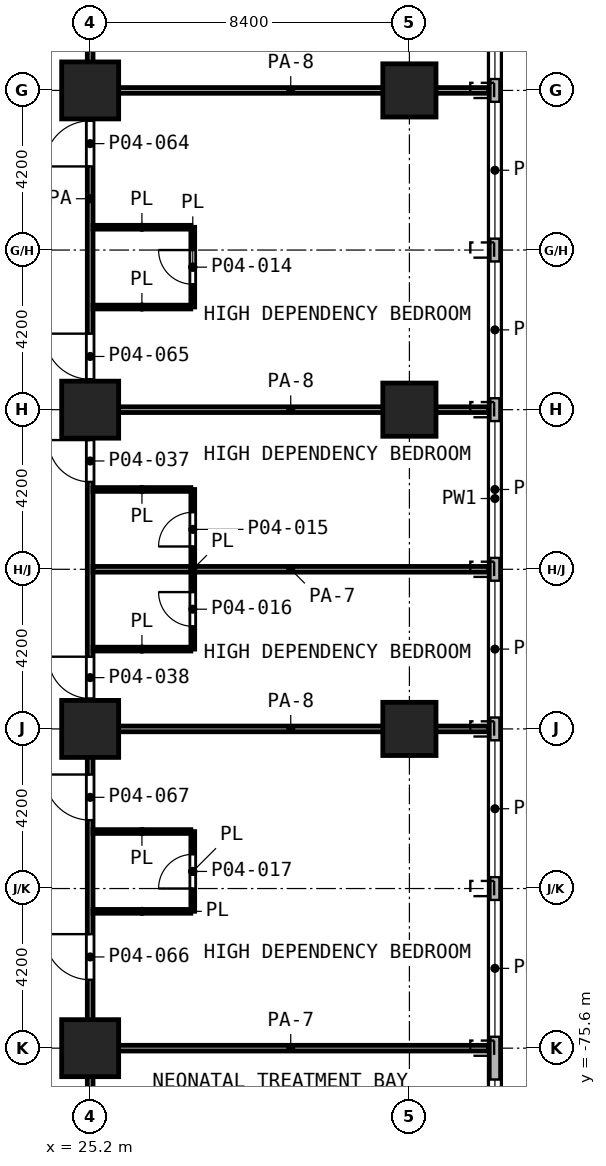
"""IFC4 building model, lengths in metres.
Left out: names, types, materials, properties, quantities, classifications, styles, units other than length and angle.
Written with IfcOpenShell. Run it as: python <this file> out.ifc"""

import sys

from ifc_helpers import new_model, si_unit, direction, frame, frame_2d, origin, origin_2d, place, context, subcontext, project, spatial, rectangle, extrude, element, fill, save


model = new_model("IFC4")
c1 = context("Model", 3, precision=1e-05, world=origin(), true_north=direction((0.0, 1.0)))
c2 = subcontext(c1, "Body", "Model", "MODEL_VIEW")
j1 = project(units=[si_unit("LENGTHUNIT", "METRE"), si_unit("PLANEANGLEUNIT", "RADIAN")], contexts=[c1])
p1 = place(None, origin())
s1 = spatial("IfcSite", under=j1, at=p1, CompositionType="ELEMENT")
p2 = place(p1, origin())
s2 = spatial("IfcBuilding", under=s1, at=p2, CompositionType="ELEMENT")
p3 = place(p2, frame((0.0, 0.0, 18.2)))
s3 = spatial("IfcBuildingStorey", under=s2, at=p3, CompositionType="ELEMENT", Elevation=18.2)
p4 = place(p3, frame((25.2, -50.4, 0.0), z_axis=(0.0, 0.0, 1.0), x_axis=(1.0, 0.0, 0.0)))
e1 = element("IfcColumn", 1, at=p4, inside=s3, PredefinedType="COLUMN", context=c2, shape_type="SweptSolid", body=[
    extrude(rectangle(XDim=1.5, YDim=1.5, at=origin_2d()), origin(), (0.0, 0.0, 1.0), 5.6),
])
p5 = place(p3, frame((33.6, -50.4, 0.0), z_axis=(0.0, 0.0, 1.0), x_axis=(1.0, 0.0, 0.0)))
e2 = element("IfcColumn", 2, at=p5, inside=s3, PredefinedType="COLUMN", context=c2, shape_type="SweptSolid", body=[
    extrude(rectangle(XDim=1.4, YDim=1.4, at=origin_2d()), origin(), (0.0, 0.0, 1.0), 5.6),
])
p6 = place(p3, frame((25.2, -58.8, 0.0), z_axis=(0.0, 0.0, 1.0), x_axis=(1.0, 0.0, 0.0)))
e3 = element("IfcColumn", 3, at=p6, inside=s3, PredefinedType="COLUMN", context=c2, shape_type="SweptSolid", body=[
    extrude(rectangle(XDim=1.5, YDim=1.5, at=origin_2d()), origin(), (0.0, 0.0, 1.0), 5.6),
])
p7 = place(p3, frame((33.6, -58.8, 0.0), z_axis=(0.0, 0.0, 1.0), x_axis=(1.0, 0.0, 0.0)))
e4 = element("IfcColumn", 4, at=p7, inside=s3, PredefinedType="COLUMN", context=c2, shape_type="SweptSolid", body=[
    extrude(rectangle(XDim=1.4, YDim=1.4, at=origin_2d()), origin(), (0.0, 0.0, 1.0), 5.6),
])
p8 = place(p3, frame((25.2, -67.2, 0.0), z_axis=(0.0, 0.0, 1.0), x_axis=(1.0, 0.0, 0.0)))
e5 = element("IfcColumn", 5, at=p8, inside=s3, PredefinedType="COLUMN", context=c2, shape_type="SweptSolid", body=[
    extrude(rectangle(XDim=1.5, YDim=1.5, at=origin_2d()), origin(), (0.0, 0.0, 1.0), 5.6),
])
p9 = place(p3, frame((33.6, -67.2, 0.0), z_axis=(0.0, 0.0, 1.0), x_axis=(1.0, 0.0, 0.0)))
e6 = element("IfcColumn", 6, at=p9, inside=s3, PredefinedType="COLUMN", context=c2, shape_type="SweptSolid", body=[
    extrude(rectangle(XDim=1.4, YDim=1.4, at=origin_2d()), origin(), (0.0, 0.0, 1.0), 5.6),
])
p10 = place(p3, frame((25.2, -75.6, 0.0), z_axis=(0.0, 0.0, 1.0), x_axis=(1.0, 0.0, 0.0)))
e7 = element("IfcColumn", 7, at=p10, inside=s3, PredefinedType="COLUMN", context=c2, shape_type="SweptSolid", body=[
    extrude(rectangle(XDim=1.5, YDim=1.5, at=origin_2d()), origin(), (0.0, 0.0, 1.0), 5.6),
])
p11 = place(p3, frame((35.85, -80.338, 0.0), z_axis=(0.0, 0.0, 1.0), x_axis=(0.0, 1.0, 0.0)))
e8 = element("IfcWall", 8, at=p11, inside=s3, PredefinedType="SOLIDWALL", context=c2, shape_type="SweptSolid", body=[
    extrude(rectangle(XDim=38.4, YDim=0.3, at=frame_2d((19.2, 0.0))), origin(), (0.0, 0.0, 1.0), 5.05),
])
p12 = place(p11, frame((1.513, 0.0, 0.9)))
e9 = element("IfcOpeningElement", 9, at=p12, cuts=e8, PredefinedType="OPENING", context=c2, shape_type="SweptSolid", body=[
    extrude(rectangle(XDim=2.4, YDim=3.0, at=frame_2d((1.2, 1.5))), frame((0.0, 0.16, 0.0), z_axis=(0.0, -1.0, 0.0), x_axis=(1.0, 0.0, 0.0)), (0.0, 0.0, 1.0), 0.32),
])
p13 = place(p11, frame((5.038, 0.0, 0.9)))
e10 = element("IfcOpeningElement", 10, at=p13, cuts=e8, PredefinedType="OPENING", context=c2, shape_type="SweptSolid", body=[
    extrude(rectangle(XDim=3.6, YDim=3.0, at=frame_2d((1.8, 1.5))), frame((0.0, 0.16, 0.0), z_axis=(0.0, -1.0, 0.0), x_axis=(1.0, 0.0, 0.0)), (0.0, 0.0, 1.0), 0.32),
])
p14 = place(p11, frame((9.238, 0.0, 0.9)))
e11 = element("IfcOpeningElement", 11, at=p14, cuts=e8, PredefinedType="OPENING", context=c2, shape_type="SweptSolid", body=[
    extrude(rectangle(XDim=3.6, YDim=3.0, at=frame_2d((1.8, 1.5))), frame((0.0, 0.16, 0.0), z_axis=(0.0, -1.0, 0.0), x_axis=(1.0, 0.0, 0.0)), (0.0, 0.0, 1.0), 0.32),
])
p15 = place(p11, frame((13.438, 0.0, 0.9)))
e12 = element("IfcOpeningElement", 12, at=p15, cuts=e8, PredefinedType="OPENING", context=c2, shape_type="SweptSolid", body=[
    extrude(rectangle(XDim=3.6, YDim=3.0, at=frame_2d((1.8, 1.5))), frame((0.0, 0.16, 0.0), z_axis=(0.0, -1.0, 0.0), x_axis=(1.0, 0.0, 0.0)), (0.0, 0.0, 1.0), 0.32),
])
p16 = place(p11, frame((17.638, 0.0, 0.9)))
e13 = element("IfcOpeningElement", 13, at=p16, cuts=e8, PredefinedType="OPENING", context=c2, shape_type="SweptSolid", body=[
    extrude(rectangle(XDim=3.6, YDim=3.0, at=frame_2d((1.8, 1.5))), frame((0.0, 0.16, 0.0), z_axis=(0.0, -1.0, 0.0), x_axis=(1.0, 0.0, 0.0)), (0.0, 0.0, 1.0), 0.32),
])
p17 = place(p11, frame((21.838, 0.0, 0.9)))
e14 = element("IfcOpeningElement", 14, at=p17, cuts=e8, PredefinedType="OPENING", context=c2, shape_type="SweptSolid", body=[
    extrude(rectangle(XDim=3.6, YDim=3.0, at=frame_2d((1.8, 1.5))), frame((0.0, 0.16, 0.0), z_axis=(0.0, -1.0, 0.0), x_axis=(1.0, 0.0, 0.0)), (0.0, 0.0, 1.0), 0.32),
])
p18 = place(p11, frame((26.038, 0.0, 0.9)))
e15 = element("IfcOpeningElement", 15, at=p18, cuts=e8, PredefinedType="OPENING", context=c2, shape_type="SweptSolid", body=[
    extrude(rectangle(XDim=3.6, YDim=3.0, at=frame_2d((1.8, 1.5))), frame((0.0, 0.16, 0.0), z_axis=(0.0, -1.0, 0.0), x_axis=(1.0, 0.0, 0.0)), (0.0, 0.0, 1.0), 0.32),
])
p19 = place(p11, frame((30.238, 0.0, 0.9)))
e16 = element("IfcOpeningElement", 16, at=p19, cuts=e8, PredefinedType="OPENING", context=c2, shape_type="SweptSolid", body=[
    extrude(rectangle(XDim=3.6, YDim=3.0, at=frame_2d((1.8, 1.5))), frame((0.0, 0.16, 0.0), z_axis=(0.0, -1.0, 0.0), x_axis=(1.0, 0.0, 0.0)), (0.0, 0.0, 1.0), 0.32),
])
p20 = place(p11, frame((34.438, 0.0, 0.9)))
e17 = element("IfcOpeningElement", 17, at=p20, cuts=e8, PredefinedType="OPENING", context=c2, shape_type="SweptSolid", body=[
    extrude(rectangle(XDim=3.6, YDim=3.0, at=frame_2d((1.8, 1.5))), frame((0.0, 0.16, 0.0), z_axis=(0.0, -1.0, 0.0), x_axis=(1.0, 0.0, 0.0)), (0.0, 0.0, 1.0), 0.32),
])
p21 = place(p3, frame((25.275, -72.0, 0.0), z_axis=(0.0, 0.0, 1.0), x_axis=(1.0, 0.0, 0.0)))
e18 = element("IfcWall", 18, at=p21, inside=s3, PredefinedType="PARTITIONING", context=c2, shape_type="SweptSolid", body=[
    extrude(rectangle(XDim=2.573, YDim=0.1, at=frame_2d((1.287, 0.0))), origin(), (0.0, 0.0, 1.0), 5.05),
])
p22 = place(p3, frame((25.275, -69.9, 0.0), z_axis=(0.0, 0.0, 1.0), x_axis=(1.0, 0.0, 0.0)))
e19 = element("IfcWall", 19, at=p22, inside=s3, PredefinedType="PARTITIONING", context=c2, shape_type="SweptSolid", body=[
    extrude(rectangle(XDim=2.574, YDim=0.1, at=frame_2d((1.287, 0.0))), origin(), (0.0, 0.0, 1.0), 5.05),
])
for number, where, z_axis, x_axis in (
    (20, (25.275, -65.1, 0.0), (0.0, 0.0, 1.0), (1.0, 0.0, 0.0)),
    (21, (25.275, -60.9, 0.0), (0.0, 0.0, 1.0), (1.0, 0.0, 0.0)),
):
    element("IfcWall", number, at=place(p3, frame(where, z_axis=z_axis, x_axis=x_axis)), inside=s3, PredefinedType="PARTITIONING", context=c2, shape_type="SweptSolid", body=[
        extrude(rectangle(XDim=2.575, YDim=0.1, at=frame_2d((1.288, 0.0))), origin(), (0.0, 0.0, 1.0), 5.05),
    ])
p23 = place(p3, frame((25.275, -56.1, 0.0), z_axis=(0.0, 0.0, 1.0), x_axis=(1.0, 0.0, 0.0)))
e22 = element("IfcWall", 22, at=p23, inside=s3, PredefinedType="PARTITIONING", context=c2, shape_type="SweptSolid", body=[
    extrude(rectangle(XDim=2.573, YDim=0.1, at=frame_2d((1.287, 0.0))), origin(), (0.0, 0.0, 1.0), 5.05),
])
p24 = place(p3, frame((25.275, -54.0, 0.0), z_axis=(0.0, 0.0, 1.0), x_axis=(1.0, 0.0, 0.0)))
e23 = element("IfcWall", 23, at=p24, inside=s3, PredefinedType="PARTITIONING", context=c2, shape_type="SweptSolid", body=[
    extrude(rectangle(XDim=2.574, YDim=0.1, at=frame_2d((1.287, 0.0))), origin(), (0.0, 0.0, 1.0), 5.05),
])
p25 = place(p3, frame((27.9, -71.998, 0.0), z_axis=(0.0, 0.0, 1.0), x_axis=(0.0, 1.0, 0.0)))
e24 = element("IfcWall", 24, at=p25, inside=s3, PredefinedType="PARTITIONING", context=c2, shape_type="SweptSolid", body=[
    extrude(rectangle(XDim=2.096, YDim=0.1, at=frame_2d((1.048, 0.0))), origin(), (0.0, 0.0, 1.0), 5.05),
])
p26 = place(p25, frame((0.598, 0.0, 0.0)))
e25 = element("IfcOpeningElement", 25, at=p26, cuts=e24, PredefinedType="OPENING", context=c2, shape_type="SweptSolid", body=[
    extrude(rectangle(XDim=0.9, YDim=2.1, at=frame_2d((0.45, 1.05))), frame((0.0, 0.06, 0.0), z_axis=(0.0, -1.0, 0.0), x_axis=(1.0, 0.0, 0.0)), (0.0, 0.0, 1.0), 0.12),
])
p27 = place(p3, frame((27.9, -65.1, 0.0), z_axis=(0.0, 0.0, 1.0), x_axis=(0.0, 1.0, 0.0)))
e26 = element("IfcWall", 26, at=p27, inside=s3, PredefinedType="PARTITIONING", context=c2, shape_type="SweptSolid", body=[
    extrude(rectangle(XDim=4.2, YDim=0.1, at=frame_2d((2.1, 0.0))), origin(), (0.0, 0.0, 1.0), 5.05),
])
p28 = place(p27, frame((2.7, 0.0, 0.0)))
e27 = element("IfcOpeningElement", 27, at=p28, cuts=e26, PredefinedType="OPENING", context=c2, shape_type="SweptSolid", body=[
    extrude(rectangle(XDim=0.9, YDim=2.1, at=frame_2d((0.45, 1.05))), frame((0.0, 0.06, 0.0), z_axis=(0.0, -1.0, 0.0), x_axis=(1.0, 0.0, 0.0)), (0.0, 0.0, 1.0), 0.12),
])
p29 = place(p27, frame((0.6, 0.0, 0.0)))
e28 = element("IfcOpeningElement", 28, at=p29, cuts=e26, PredefinedType="OPENING", context=c2, shape_type="SweptSolid", body=[
    extrude(rectangle(XDim=0.9, YDim=2.1, at=frame_2d((0.45, 1.05))), frame((0.0, 0.06, 0.0), z_axis=(0.0, -1.0, 0.0), x_axis=(1.0, 0.0, 0.0)), (0.0, 0.0, 1.0), 0.12),
])
p30 = place(p3, frame((27.9, -56.098, 0.0), z_axis=(0.0, 0.0, 1.0), x_axis=(0.0, 1.0, 0.0)))
e29 = element("IfcWall", 29, at=p30, inside=s3, PredefinedType="PARTITIONING", context=c2, shape_type="SweptSolid", body=[
    extrude(rectangle(XDim=2.096, YDim=0.1, at=frame_2d((1.048, 0.0))), origin(), (0.0, 0.0, 1.0), 5.05),
])
p31 = place(p30, frame((0.598, 0.0, 0.0)))
e30 = element("IfcOpeningElement", 30, at=p31, cuts=e29, PredefinedType="OPENING", context=c2, shape_type="SweptSolid", body=[
    extrude(rectangle(XDim=0.9, YDim=2.1, at=frame_2d((0.45, 1.05))), frame((0.0, 0.06, 0.0), z_axis=(0.0, -1.0, 0.0), x_axis=(1.0, 0.0, 0.0)), (0.0, 0.0, 1.0), 0.12),
])
p32 = place(p3, frame((25.275, -75.6, 0.0), z_axis=(0.0, 0.0, 1.0), x_axis=(1.0, 0.0, 0.0)))
e31 = element("IfcWall", 31, at=p32, inside=s3, PredefinedType="PARTITIONING", context=c2, shape_type="SweptSolid", body=[
    extrude(rectangle(XDim=10.405, YDim=0.15, at=frame_2d((5.203, 0.0))), origin(), (0.0, 0.0, 1.0), 3.65),
])
p33 = place(p3, frame((25.275, -67.2, 0.0), z_axis=(0.0, 0.0, 1.0), x_axis=(1.0, 0.0, 0.0)))
e32 = element("IfcWall", 32, at=p33, inside=s3, PredefinedType="PARTITIONING", context=c2, shape_type="SweptSolid", body=[
    extrude(rectangle(XDim=10.405, YDim=0.15, at=frame_2d((5.203, 0.0))), origin(), (0.0, 0.0, 1.0), 4.15),
])
p34 = place(p3, frame((25.275, -63.0, 0.0), z_axis=(0.0, 0.0, 1.0), x_axis=(1.0, 0.0, 0.0)))
e33 = element("IfcWall", 33, at=p34, inside=s3, PredefinedType="PARTITIONING", context=c2, shape_type="SweptSolid", body=[
    extrude(rectangle(XDim=10.405, YDim=0.15, at=frame_2d((5.203, 0.0))), origin(), (0.0, 0.0, 1.0), 3.65),
])
for number, where, z_axis, x_axis in (
    (34, (25.275, -58.8, 0.0), (0.0, 0.0, 1.0), (1.0, 0.0, 0.0)),
    (35, (25.275, -50.4, 0.0), (0.0, 0.0, 1.0), (1.0, 0.0, 0.0)),
):
    element("IfcWall", number, at=place(p3, frame(where, z_axis=z_axis, x_axis=x_axis)), inside=s3, PredefinedType="PARTITIONING", context=c2, shape_type="SweptSolid", body=[
        extrude(rectangle(XDim=10.405, YDim=0.15, at=frame_2d((5.203, 0.0))), origin(), (0.0, 0.0, 1.0), 4.15),
    ])
p35 = place(p3, frame((25.2, -81.3, 0.0), z_axis=(0.0, 0.0, 1.0), x_axis=(0.0, 1.0, 0.0)))
e36 = element("IfcWall", 36, at=p35, inside=s3, PredefinedType="PARTITIONING", context=c2, shape_type="SweptSolid", body=[
    extrude(rectangle(XDim=56.1, YDim=0.15, at=frame_2d((28.05, 0.0))), origin(), (0.0, 0.0, 1.0), 5.05),
])
p36 = place(p35, frame((48.5, 0.0, 0.0)))
e37 = element("IfcOpeningElement", 37, at=p36, cuts=e36, PredefinedType="OPENING", context=c2, shape_type="SweptSolid", body=[
    extrude(rectangle(XDim=1.2, YDim=2.1, at=frame_2d((0.6, 1.05))), frame((0.0, 0.085, 0.0), z_axis=(0.0, -1.0, 0.0), x_axis=(1.0, 0.0, 0.0)), (0.0, 0.0, 1.0), 0.17),
])
p37 = place(p35, frame((40.1, 0.0, 0.0)))
e38 = element("IfcOpeningElement", 38, at=p37, cuts=e36, PredefinedType="OPENING", context=c2, shape_type="SweptSolid", body=[
    extrude(rectangle(XDim=1.2, YDim=2.1, at=frame_2d((0.6, 1.05))), frame((0.0, 0.085, 0.0), z_axis=(0.0, -1.0, 0.0), x_axis=(1.0, 0.0, 0.0)), (0.0, 0.0, 1.0), 0.17),
])
p38 = place(p35, frame((37.3, 0.0, 0.0)))
e39 = element("IfcOpeningElement", 39, at=p38, cuts=e36, PredefinedType="OPENING", context=c2, shape_type="SweptSolid", body=[
    extrude(rectangle(XDim=1.2, YDim=2.1, at=frame_2d((0.6, 1.05))), frame((0.0, 0.085, 0.0), z_axis=(0.0, -1.0, 0.0), x_axis=(1.0, 0.0, 0.0)), (0.0, 0.0, 1.0), 0.17),
])
p39 = place(p35, frame((28.9, 0.0, 0.0)))
e40 = element("IfcOpeningElement", 40, at=p39, cuts=e36, PredefinedType="OPENING", context=c2, shape_type="SweptSolid", body=[
    extrude(rectangle(XDim=1.2, YDim=2.1, at=frame_2d((0.6, 1.05))), frame((0.0, 0.085, 0.0), z_axis=(0.0, -1.0, 0.0), x_axis=(1.0, 0.0, 0.0)), (0.0, 0.0, 1.0), 0.17),
])
p40 = place(p35, frame((23.3, 0.0, 0.0)))
e41 = element("IfcOpeningElement", 41, at=p40, cuts=e36, PredefinedType="OPENING", context=c2, shape_type="SweptSolid", body=[
    extrude(rectangle(XDim=1.2, YDim=2.1, at=frame_2d((0.6, 1.05))), frame((0.0, 0.085, 0.0), z_axis=(0.0, -1.0, 0.0), x_axis=(1.0, 0.0, 0.0)), (0.0, 0.0, 1.0), 0.17),
])
p41 = place(p35, frame((20.6, 0.0, 0.0)))
e42 = element("IfcOpeningElement", 42, at=p41, cuts=e36, PredefinedType="OPENING", context=c2, shape_type="SweptSolid", body=[
    extrude(rectangle(XDim=1.1, YDim=2.1, at=frame_2d((0.55, 1.05))), frame((0.0, 0.085, 0.0), z_axis=(0.0, -1.0, 0.0), x_axis=(1.0, 0.0, 0.0)), (0.0, 0.0, 1.0), 0.17),
])
p42 = place(p35, frame((14.9, 0.0, 0.0)))
e43 = element("IfcOpeningElement", 43, at=p42, cuts=e36, PredefinedType="OPENING", context=c2, shape_type="SweptSolid", body=[
    extrude(rectangle(XDim=1.1, YDim=2.1, at=frame_2d((0.55, 1.05))), frame((0.0, 0.085, 0.0), z_axis=(0.0, -1.0, 0.0), x_axis=(1.0, 0.0, 0.0)), (0.0, 0.0, 1.0), 0.17),
])
p43 = place(p35, frame((7.5, 0.0, 0.0)))
e44 = element("IfcOpeningElement", 44, at=p43, cuts=e36, PredefinedType="OPENING", context=c2, shape_type="SweptSolid", body=[
    extrude(rectangle(XDim=1.2, YDim=2.1, at=frame_2d((0.6, 1.05))), frame((0.0, 0.085, 0.0), z_axis=(0.0, -1.0, 0.0), x_axis=(1.0, 0.0, 0.0)), (0.0, 0.0, 1.0), 0.17),
])
p44 = place(p35, frame((11.7, 0.0, 0.0)))
e45 = element("IfcOpeningElement", 45, at=p44, cuts=e36, PredefinedType="OPENING", context=c2, shape_type="SweptSolid", body=[
    extrude(rectangle(XDim=1.2, YDim=2.1, at=frame_2d((0.6, 1.05))), frame((0.0, 0.085, 0.0), z_axis=(0.0, -1.0, 0.0), x_axis=(1.0, 0.0, 0.0)), (0.0, 0.0, 1.0), 0.17),
])
p45 = place(p35, frame((3.15, 0.0, 0.0)))
e46 = element("IfcOpeningElement", 46, at=p45, cuts=e36, PredefinedType="OPENING", context=c2, shape_type="SweptSolid", body=[
    extrude(rectangle(XDim=1.2, YDim=2.1, at=frame_2d((0.6, 1.05))), frame((0.0, 0.085, 0.0), z_axis=(0.0, -1.0, 0.0), x_axis=(1.0, 0.0, 0.0)), (0.0, 0.0, 1.0), 0.17),
])
p46 = place(p12, origin())
e47 = element("IfcWindow", 47, at=p46, inside=s3, PartitioningType="SINGLE_PANEL", PredefinedType="WINDOW", context=c2, shape_type="SweptSolid", body=[
    extrude(rectangle(XDim=2.4, YDim=3.0, at=frame_2d((1.2, 1.5))), frame((0.0, 0.03, 0.0), z_axis=(0.0, -1.0, 0.0), x_axis=(1.0, 0.0, 0.0)), (0.0, 0.0, 1.0), 0.06),
])
fill(e9, e47)
p47 = place(p13, origin())
e48 = element("IfcWindow", 48, at=p47, inside=s3, PartitioningType="SINGLE_PANEL", PredefinedType="WINDOW", context=c2, shape_type="SweptSolid", body=[
    extrude(rectangle(XDim=3.6, YDim=3.0, at=frame_2d((1.8, 1.5))), frame((0.0, 0.03, 0.0), z_axis=(0.0, -1.0, 0.0), x_axis=(1.0, 0.0, 0.0)), (0.0, 0.0, 1.0), 0.06),
])
fill(e10, e48)
p48 = place(p14, origin())
e49 = element("IfcWindow", 49, at=p48, inside=s3, PartitioningType="SINGLE_PANEL", PredefinedType="WINDOW", context=c2, shape_type="SweptSolid", body=[
    extrude(rectangle(XDim=3.6, YDim=3.0, at=frame_2d((1.8, 1.5))), frame((0.0, 0.03, 0.0), z_axis=(0.0, -1.0, 0.0), x_axis=(1.0, 0.0, 0.0)), (0.0, 0.0, 1.0), 0.06),
])
fill(e11, e49)
p49 = place(p15, origin())
e50 = element("IfcWindow", 50, at=p49, inside=s3, PartitioningType="SINGLE_PANEL", PredefinedType="WINDOW", context=c2, shape_type="SweptSolid", body=[
    extrude(rectangle(XDim=3.6, YDim=3.0, at=frame_2d((1.8, 1.5))), frame((0.0, 0.03, 0.0), z_axis=(0.0, -1.0, 0.0), x_axis=(1.0, 0.0, 0.0)), (0.0, 0.0, 1.0), 0.06),
])
fill(e12, e50)
p50 = place(p16, origin())
e51 = element("IfcWindow", 51, at=p50, inside=s3, PartitioningType="SINGLE_PANEL", PredefinedType="WINDOW", context=c2, shape_type="SweptSolid", body=[
    extrude(rectangle(XDim=3.6, YDim=3.0, at=frame_2d((1.8, 1.5))), frame((0.0, 0.03, 0.0), z_axis=(0.0, -1.0, 0.0), x_axis=(1.0, 0.0, 0.0)), (0.0, 0.0, 1.0), 0.06),
])
fill(e13, e51)
p51 = place(p17, origin())
e52 = element("IfcWindow", 52, at=p51, inside=s3, PartitioningType="SINGLE_PANEL", PredefinedType="WINDOW", context=c2, shape_type="SweptSolid", body=[
    extrude(rectangle(XDim=3.6, YDim=3.0, at=frame_2d((1.8, 1.5))), frame((0.0, 0.03, 0.0), z_axis=(0.0, -1.0, 0.0), x_axis=(1.0, 0.0, 0.0)), (0.0, 0.0, 1.0), 0.06),
])
fill(e14, e52)
p52 = place(p18, origin())
e53 = element("IfcWindow", 53, at=p52, inside=s3, PartitioningType="SINGLE_PANEL", PredefinedType="WINDOW", context=c2, shape_type="SweptSolid", body=[
    extrude(rectangle(XDim=3.6, YDim=3.0, at=frame_2d((1.8, 1.5))), frame((0.0, 0.03, 0.0), z_axis=(0.0, -1.0, 0.0), x_axis=(1.0, 0.0, 0.0)), (0.0, 0.0, 1.0), 0.06),
])
fill(e15, e53)
p53 = place(p19, origin())
e54 = element("IfcWindow", 54, at=p53, inside=s3, PartitioningType="SINGLE_PANEL", PredefinedType="WINDOW", context=c2, shape_type="SweptSolid", body=[
    extrude(rectangle(XDim=3.6, YDim=3.0, at=frame_2d((1.8, 1.5))), frame((0.0, 0.03, 0.0), z_axis=(0.0, -1.0, 0.0), x_axis=(1.0, 0.0, 0.0)), (0.0, 0.0, 1.0), 0.06),
])
fill(e16, e54)
p54 = place(p39, origin())
e55 = element("IfcDoor", 55, at=p54, inside=s3, OperationType="SINGLE_SWING_LEFT", PredefinedType="DOOR", context=c2, shape_type="SweptSolid", body=[
    extrude(rectangle(XDim=1.2, YDim=2.1, at=frame_2d((0.6, 1.05))), frame((0.0, 0.025, 0.0), z_axis=(0.0, -1.0, 0.0), x_axis=(1.0, 0.0, 0.0)), (0.0, 0.0, 1.0), 0.05),
])
fill(e40, e55)
p55 = place(p40, origin())
e56 = element("IfcDoor", 56, at=p55, inside=s3, OperationType="SINGLE_SWING_RIGHT", PredefinedType="DOOR", context=c2, shape_type="SweptSolid", body=[
    extrude(rectangle(XDim=1.2, YDim=2.1, at=frame_2d((0.6, 1.05))), frame((0.0, 0.025, 0.0), z_axis=(0.0, -1.0, 0.0), x_axis=(1.0, 0.0, 0.0)), (0.0, 0.0, 1.0), 0.05),
])
fill(e41, e56)
p56 = place(p31, origin())
e57 = element("IfcDoor", 57, at=p56, inside=s3, OperationType="SINGLE_SWING_RIGHT", PredefinedType="DOOR", context=c2, shape_type="SweptSolid", body=[
    extrude(rectangle(XDim=0.9, YDim=2.1, at=frame_2d((0.45, 1.05))), frame((0.0, 0.025, 0.0), z_axis=(0.0, -1.0, 0.0), x_axis=(1.0, 0.0, 0.0)), (0.0, 0.0, 1.0), 0.05),
])
fill(e30, e57)
p57 = place(p41, origin())
e58 = element("IfcDoor", 58, at=p57, inside=s3, OperationType="SINGLE_SWING_RIGHT", PredefinedType="DOOR", context=c2, shape_type="SweptSolid", body=[
    extrude(rectangle(XDim=1.1, YDim=2.1, at=frame_2d((0.55, 1.05))), frame((0.0, 0.025, 0.0), z_axis=(0.0, -1.0, 0.0), x_axis=(1.0, 0.0, 0.0)), (0.0, 0.0, 1.0), 0.05),
])
fill(e42, e58)
p58 = place(p28, origin())
e59 = element("IfcDoor", 59, at=p58, inside=s3, OperationType="SINGLE_SWING_LEFT", PredefinedType="DOOR", context=c2, shape_type="SweptSolid", body=[
    extrude(rectangle(XDim=0.9, YDim=2.1, at=frame_2d((0.45, 1.05))), frame((0.0, 0.025, 0.0), z_axis=(0.0, -1.0, 0.0), x_axis=(1.0, 0.0, 0.0)), (0.0, 0.0, 1.0), 0.05),
])
fill(e27, e59)
p59 = place(p42, origin())
e60 = element("IfcDoor", 60, at=p59, inside=s3, OperationType="SINGLE_SWING_RIGHT", PredefinedType="DOOR", context=c2, shape_type="SweptSolid", body=[
    extrude(rectangle(XDim=1.1, YDim=2.1, at=frame_2d((0.55, 1.05))), frame((0.0, 0.025, 0.0), z_axis=(0.0, -1.0, 0.0), x_axis=(1.0, 0.0, 0.0)), (0.0, 0.0, 1.0), 0.05),
])
fill(e43, e60)
p60 = place(p29, origin())
e61 = element("IfcDoor", 61, at=p60, inside=s3, OperationType="SINGLE_SWING_RIGHT", PredefinedType="DOOR", context=c2, shape_type="SweptSolid", body=[
    extrude(rectangle(XDim=0.9, YDim=2.1, at=frame_2d((0.45, 1.05))), frame((0.0, 0.025, 0.0), z_axis=(0.0, -1.0, 0.0), x_axis=(1.0, 0.0, 0.0)), (0.0, 0.0, 1.0), 0.05),
])
fill(e28, e61)
p61 = place(p43, origin())
e62 = element("IfcDoor", 62, at=p61, inside=s3, OperationType="SINGLE_SWING_RIGHT", PredefinedType="DOOR", context=c2, shape_type="SweptSolid", body=[
    extrude(rectangle(XDim=1.2, YDim=2.1, at=frame_2d((0.6, 1.05))), frame((0.0, 0.025, 0.0), z_axis=(0.0, -1.0, 0.0), x_axis=(1.0, 0.0, 0.0)), (0.0, 0.0, 1.0), 0.05),
])
fill(e44, e62)
p62 = place(p44, origin())
e63 = element("IfcDoor", 63, at=p62, inside=s3, OperationType="SINGLE_SWING_RIGHT", PredefinedType="DOOR", context=c2, shape_type="SweptSolid", body=[
    extrude(rectangle(XDim=1.2, YDim=2.1, at=frame_2d((0.6, 1.05))), frame((0.0, 0.025, 0.0), z_axis=(0.0, -1.0, 0.0), x_axis=(1.0, 0.0, 0.0)), (0.0, 0.0, 1.0), 0.05),
])
fill(e45, e63)
p63 = place(p26, origin())
e64 = element("IfcDoor", 64, at=p63, inside=s3, OperationType="SINGLE_SWING_LEFT", PredefinedType="DOOR", context=c2, shape_type="SweptSolid", body=[
    extrude(rectangle(XDim=0.9, YDim=2.1, at=frame_2d((0.45, 1.05))), frame((0.0, 0.025, 0.0), z_axis=(0.0, -1.0, 0.0), x_axis=(1.0, 0.0, 0.0)), (0.0, 0.0, 1.0), 0.05),
])
fill(e25, e64)
save(model, sys.argv[1])
